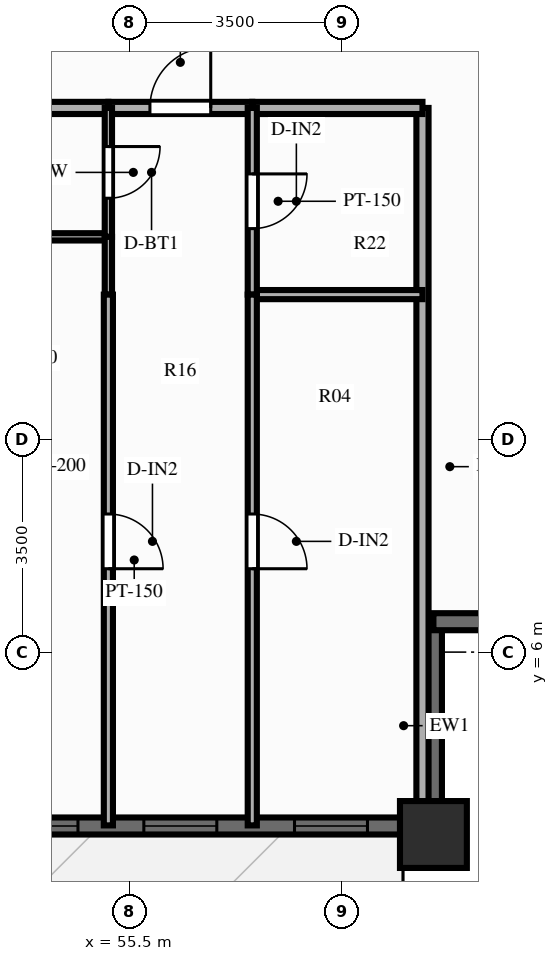
"""IFC4 building model, lengths in metres.
Left out: names, types, materials, properties, quantities, classifications, styles, units other than length and angle.
Written with IfcOpenShell. Run it as: python <this file> out.ifc"""

import sys

from ifc_helpers import new_model, si_unit, direction, frame, frame_2d, origin, origin_2d, place, context, subcontext, project, spatial, rectangle, extrude, source, transform, mapped, element, fill, save


model = new_model("IFC4")
c1 = context("Model", 3, precision=1e-05, world=origin(), true_north=direction((0.0, 1.0)))
c2 = subcontext(c1, "Body", "Model", "MODEL_VIEW")
j1 = project(units=[si_unit("LENGTHUNIT", "METRE"), si_unit("PLANEANGLEUNIT", "RADIAN")], contexts=[c1])
p1 = place(None, origin())
s1 = spatial("IfcSite", under=j1, at=p1, CompositionType="ELEMENT")
p2 = place(p1, origin())
s2 = spatial("IfcBuilding", under=s1, at=p2, CompositionType="ELEMENT")
p3 = place(p2, frame((0.0, 0.0, 22.4)))
s3 = spatial("IfcBuildingStorey", under=s2, at=p3, CompositionType="ELEMENT", Elevation=22.4)
m1 = source(origin(), c2, "Body", "SweptSolid", [
    extrude(rectangle(XDim=1.1, YDim=1.1, at=origin_2d()), origin(), (0.0, 0.0, 1.0), 3.0),
])
p4 = place(p3, frame((60.5, 3.0, 0.0), z_axis=(0.0, 0.0, 1.0), x_axis=(1.0, 0.0, 0.0)))
e1 = element("IfcColumn", 1, at=p4, inside=s3, PredefinedType="COLUMN", context=c2, shape_type="MappedRepresentation", body=[
    mapped(m1, transform((0.0, 0.0, 0.0), scale=1.0)),
])
p5 = place(p3, frame((15.5, 3.14, 0.0), z_axis=(0.0, 0.0, 1.0), x_axis=(1.0, 0.0, 0.0)))
e2 = element("IfcWall", 2, at=p5, inside=s3, PredefinedType="SOLIDWALL", context=c2, shape_type="SweptSolid", body=[
    extrude(rectangle(XDim=45.0, YDim=0.28, at=frame_2d((22.5, 0.0))), origin(), (0.0, 0.0, 1.0), 2.28),
])
p6 = place(p5, frame((0.785, 0.0, 0.25)))
e3 = element("IfcOpeningElement", 3, at=p6, cuts=e2, PredefinedType="OPENING", context=c2, shape_type="SweptSolid", body=[
    extrude(rectangle(XDim=1.2, YDim=1.5, at=frame_2d((0.6, 0.75))), frame((0.0, 0.152, 0.0), z_axis=(0.0, -1.0, 0.0), x_axis=(1.0, 0.0, 0.0)), (0.0, 0.0, 1.0), 0.304),
])
p7 = place(p5, frame((3.033, 0.0, 0.25)))
e4 = element("IfcOpeningElement", 4, at=p7, cuts=e2, PredefinedType="OPENING", context=c2, shape_type="SweptSolid", body=[
    extrude(rectangle(XDim=1.2, YDim=1.5, at=frame_2d((0.6, 0.75))), frame((0.0, 0.152, 0.0), z_axis=(0.0, -1.0, 0.0), x_axis=(1.0, 0.0, 0.0)), (0.0, 0.0, 1.0), 0.304),
])
p8 = place(p5, frame((5.727, 0.0, 0.25)))
e5 = element("IfcOpeningElement", 5, at=p8, cuts=e2, PredefinedType="OPENING", context=c2, shape_type="SweptSolid", body=[
    extrude(rectangle(XDim=1.2, YDim=1.5, at=frame_2d((0.6, 0.75))), frame((0.0, 0.152, 0.0), z_axis=(0.0, -1.0, 0.0), x_axis=(1.0, 0.0, 0.0)), (0.0, 0.0, 1.0), 0.304),
])
p9 = place(p5, frame((8.269, 0.0, 0.25)))
e6 = element("IfcOpeningElement", 6, at=p9, cuts=e2, PredefinedType="OPENING", context=c2, shape_type="SweptSolid", body=[
    extrude(rectangle(XDim=1.2, YDim=1.5, at=frame_2d((0.6, 0.75))), frame((0.0, 0.152, 0.0), z_axis=(0.0, -1.0, 0.0), x_axis=(1.0, 0.0, 0.0)), (0.0, 0.0, 1.0), 0.304),
])
p10 = place(p5, frame((10.621, 0.0, 0.25)))
e7 = element("IfcOpeningElement", 7, at=p10, cuts=e2, PredefinedType="OPENING", context=c2, shape_type="SweptSolid", body=[
    extrude(rectangle(XDim=1.2, YDim=1.5, at=frame_2d((0.6, 0.75))), frame((0.0, 0.152, 0.0), z_axis=(0.0, -1.0, 0.0), x_axis=(1.0, 0.0, 0.0)), (0.0, 0.0, 1.0), 0.304),
])
p11 = place(p5, frame((13.316, 0.0, 0.25)))
e8 = element("IfcOpeningElement", 8, at=p11, cuts=e2, PredefinedType="OPENING", context=c2, shape_type="SweptSolid", body=[
    extrude(rectangle(XDim=1.2, YDim=1.5, at=frame_2d((0.6, 0.75))), frame((0.0, 0.152, 0.0), z_axis=(0.0, -1.0, 0.0), x_axis=(1.0, 0.0, 0.0)), (0.0, 0.0, 1.0), 0.304),
])
p12 = place(p5, frame((16.624, 0.0, 0.25)))
e9 = element("IfcOpeningElement", 9, at=p12, cuts=e2, PredefinedType="OPENING", context=c2, shape_type="SweptSolid", body=[
    extrude(rectangle(XDim=0.7, YDim=1.5, at=frame_2d((0.35, 0.75))), frame((0.0, 0.152, 0.0), z_axis=(0.0, -1.0, 0.0), x_axis=(1.0, 0.0, 0.0)), (0.0, 0.0, 1.0), 0.304),
])
p13 = place(p5, frame((18.141, 0.0, 0.25)))
e10 = element("IfcOpeningElement", 10, at=p13, cuts=e2, PredefinedType="OPENING", context=c2, shape_type="SweptSolid", body=[
    extrude(rectangle(XDim=1.2, YDim=1.5, at=frame_2d((0.6, 0.75))), frame((0.0, 0.152, 0.0), z_axis=(0.0, -1.0, 0.0), x_axis=(1.0, 0.0, 0.0)), (0.0, 0.0, 1.0), 0.304),
])
p14 = place(p5, frame((21.874, 0.0, 0.0), z_axis=(0.0, 0.0, 1.0), x_axis=(-1.0, 0.0, 0.0)))
e11 = element("IfcOpeningElement", 11, at=p14, cuts=e2, PredefinedType="OPENING", context=c2, shape_type="SweptSolid", body=[
    extrude(rectangle(XDim=1.1, YDim=2.15, at=frame_2d((0.55, 1.075))), frame((0.0, 0.152, 0.0), z_axis=(0.0, -1.0, 0.0), x_axis=(1.0, 0.0, 0.0)), (0.0, 0.0, 1.0), 0.304),
])
p15 = place(p5, frame((23.223, 0.0, 0.25)))
e12 = element("IfcOpeningElement", 12, at=p15, cuts=e2, PredefinedType="OPENING", context=c2, shape_type="SweptSolid", body=[
    extrude(rectangle(XDim=1.2, YDim=1.5, at=frame_2d((0.6, 0.75))), frame((0.0, 0.152, 0.0), z_axis=(0.0, -1.0, 0.0), x_axis=(1.0, 0.0, 0.0)), (0.0, 0.0, 1.0), 0.304),
])
p16 = place(p5, frame((25.507, 0.0, 0.25)))
e13 = element("IfcOpeningElement", 13, at=p16, cuts=e2, PredefinedType="OPENING", context=c2, shape_type="SweptSolid", body=[
    extrude(rectangle(XDim=1.2, YDim=1.5, at=frame_2d((0.6, 0.75))), frame((0.0, 0.152, 0.0), z_axis=(0.0, -1.0, 0.0), x_axis=(1.0, 0.0, 0.0)), (0.0, 0.0, 1.0), 0.304),
])
p17 = place(p5, frame((27.6, 0.0, 0.25)))
e14 = element("IfcOpeningElement", 14, at=p17, cuts=e2, PredefinedType="OPENING", context=c2, shape_type="SweptSolid", body=[
    extrude(rectangle(XDim=0.7, YDim=1.5, at=frame_2d((0.35, 0.75))), frame((0.0, 0.152, 0.0), z_axis=(0.0, -1.0, 0.0), x_axis=(1.0, 0.0, 0.0)), (0.0, 0.0, 1.0), 0.304),
])
p18 = place(p5, frame((30.589, 0.0, 0.25)))
e15 = element("IfcOpeningElement", 15, at=p18, cuts=e2, PredefinedType="OPENING", context=c2, shape_type="SweptSolid", body=[
    extrude(rectangle(XDim=1.2, YDim=1.5, at=frame_2d((0.6, 0.75))), frame((0.0, 0.152, 0.0), z_axis=(0.0, -1.0, 0.0), x_axis=(1.0, 0.0, 0.0)), (0.0, 0.0, 1.0), 0.304),
])
p19 = place(p5, frame((32.872, 0.0, 0.25)))
e16 = element("IfcOpeningElement", 16, at=p19, cuts=e2, PredefinedType="OPENING", context=c2, shape_type="SweptSolid", body=[
    extrude(rectangle(XDim=1.2, YDim=1.5, at=frame_2d((0.6, 0.75))), frame((0.0, 0.152, 0.0), z_axis=(0.0, -1.0, 0.0), x_axis=(1.0, 0.0, 0.0)), (0.0, 0.0, 1.0), 0.304),
])
p20 = place(p5, frame((35.455, 0.0, 0.25)))
e17 = element("IfcOpeningElement", 17, at=p20, cuts=e2, PredefinedType="OPENING", context=c2, shape_type="SweptSolid", body=[
    extrude(rectangle(XDim=1.2, YDim=1.5, at=frame_2d((0.6, 0.75))), frame((0.0, 0.152, 0.0), z_axis=(0.0, -1.0, 0.0), x_axis=(1.0, 0.0, 0.0)), (0.0, 0.0, 1.0), 0.304),
])
p21 = place(p5, frame((37.954, 0.0, 0.25)))
e18 = element("IfcOpeningElement", 18, at=p21, cuts=e2, PredefinedType="OPENING", context=c2, shape_type="SweptSolid", body=[
    extrude(rectangle(XDim=1.2, YDim=1.5, at=frame_2d((0.6, 0.75))), frame((0.0, 0.152, 0.0), z_axis=(0.0, -1.0, 0.0), x_axis=(1.0, 0.0, 0.0)), (0.0, 0.0, 1.0), 0.304),
])
p22 = place(p5, frame((40.238, 0.0, 0.25)))
e19 = element("IfcOpeningElement", 19, at=p22, cuts=e2, PredefinedType="OPENING", context=c2, shape_type="SweptSolid", body=[
    extrude(rectangle(XDim=1.2, YDim=1.5, at=frame_2d((0.6, 0.75))), frame((0.0, 0.152, 0.0), z_axis=(0.0, -1.0, 0.0), x_axis=(1.0, 0.0, 0.0)), (0.0, 0.0, 1.0), 0.304),
])
p23 = place(p5, frame((42.716, 0.0, 0.25)))
e20 = element("IfcOpeningElement", 20, at=p23, cuts=e2, PredefinedType="OPENING", context=c2, shape_type="SweptSolid", body=[
    extrude(rectangle(XDim=1.2, YDim=1.5, at=frame_2d((0.6, 0.75))), frame((0.0, 0.152, 0.0), z_axis=(0.0, -1.0, 0.0), x_axis=(1.0, 0.0, 0.0)), (0.0, 0.0, 1.0), 0.304),
])
for number, where, z_axis, x_axis in (
    (21, (60.5, 3.08, 0.0), (0.0, 0.0, 1.0), (0.0, 1.0, 0.0)),
    (22, (60.5, 6.5, 0.0), (0.0, 0.0, 1.0), (1.0, 0.0, 0.0)),
):
    element("IfcWall", number, at=place(p3, frame(where, z_axis=z_axis, x_axis=x_axis)), inside=s3, PredefinedType="SOLIDWALL", context=c2, shape_type="SweptSolid", body=[
        extrude(rectangle(XDim=3.42, YDim=0.28, at=frame_2d((1.71, 0.0))), origin(), (0.0, 0.0, 1.0), 2.28),
    ])
p24 = place(p3, frame((60.32, 14.95, 0.0), z_axis=(0.0, 0.0, 1.0), x_axis=(0.0, -1.0, 0.0)))
e23 = element("IfcWall", 23, at=p24, inside=s3, PredefinedType="PARTITIONING", context=c2, shape_type="SweptSolid", body=[
    extrude(rectangle(XDim=11.8, YDim=0.2, at=frame_2d((5.9, 0.0))), origin(), (0.0, 0.0, 1.0), 2.79),
])
p25 = place(p3, frame((52.954, 14.95, 0.0), z_axis=(0.0, 0.0, 1.0), x_axis=(1.0, 0.0, 0.0)))
e24 = element("IfcWall", 24, at=p25, inside=s3, PredefinedType="PARTITIONING", context=c2, shape_type="SweptSolid", body=[
    extrude(rectangle(XDim=2.2, YDim=0.2, at=frame_2d((1.1, 0.0))), origin(), (0.0, 0.0, 1.0), 2.79),
])
p26 = place(p3, frame((55.154, 14.95, 0.0), z_axis=(0.0, 0.0, 1.0), x_axis=(1.0, 0.0, 0.0)))
e25 = element("IfcWall", 25, at=p26, inside=s3, PredefinedType="PARTITIONING", context=c2, shape_type="SweptSolid", body=[
    extrude(rectangle(XDim=2.367, YDim=0.2, at=frame_2d((1.183, 0.0))), origin(), (0.0, 0.0, 1.0), 2.79),
])
p27 = place(p26, frame((0.683, 0.0, 0.0)))
e26 = element("IfcOpeningElement", 26, at=p27, cuts=e25, PredefinedType="OPENING", context=c2, shape_type="SweptSolid", body=[
    extrude(rectangle(XDim=1.0, YDim=2.15, at=frame_2d((0.5, 1.075))), frame((0.0, 0.112, 0.0), z_axis=(0.0, -1.0, 0.0), x_axis=(1.0, 0.0, 0.0)), (0.0, 0.0, 1.0), 0.224),
])
p28 = place(p3, frame((57.521, 14.95, 0.0), z_axis=(0.0, 0.0, 1.0), x_axis=(1.0, 0.0, 0.0)))
e27 = element("IfcWall", 27, at=p28, inside=s3, PredefinedType="PARTITIONING", context=c2, shape_type="SweptSolid", body=[
    extrude(rectangle(XDim=2.799, YDim=0.2, at=frame_2d((1.399, 0.0))), origin(), (0.0, 0.0, 1.0), 2.79),
])
p29 = place(p3, frame((52.954, 12.83, 0.0), z_axis=(0.0, 0.0, 1.0), x_axis=(1.0, 0.0, 0.0)))
e28 = element("IfcWall", 28, at=p29, inside=s3, PredefinedType="PARTITIONING", context=c2, shape_type="SweptSolid", body=[
    extrude(rectangle(XDim=2.2, YDim=0.12, at=frame_2d((1.1, 0.0))), origin(), (0.0, 0.0, 1.0), 2.79),
])
p30 = place(p3, frame((57.521, 11.88, 0.0), z_axis=(0.0, 0.0, 1.0), x_axis=(1.0, 0.0, 0.0)))
e29 = element("IfcWall", 29, at=p30, inside=s3, PredefinedType="PARTITIONING", context=c2, shape_type="SweptSolid", body=[
    extrude(rectangle(XDim=2.799, YDim=0.15, at=frame_2d((1.399, 0.0))), origin(), (0.0, 0.0, 1.0), 2.79),
])
p31 = place(p3, frame((55.154, 14.95, 0.0), z_axis=(0.0, 0.0, 1.0), x_axis=(0.0, -1.0, 0.0)))
e30 = element("IfcWall", 30, at=p31, inside=s3, PredefinedType="PARTITIONING", context=c2, shape_type="SweptSolid", body=[
    extrude(rectangle(XDim=2.12, YDim=0.12, at=frame_2d((1.06, 0.0))), origin(), (0.0, 0.0, 1.0), 2.79),
])
p32 = place(p31, frame((0.635, 0.0, 0.0)))
e31 = element("IfcOpeningElement", 31, at=p32, cuts=e30, PredefinedType="OPENING", context=c2, shape_type="SweptSolid", body=[
    extrude(rectangle(XDim=0.85, YDim=2.05, at=frame_2d((0.425, 1.025))), frame((0.0, 0.072, 0.0), z_axis=(0.0, -1.0, 0.0), x_axis=(1.0, 0.0, 0.0)), (0.0, 0.0, 1.0), 0.144),
])
p33 = place(p3, frame((55.154, 12.83, 0.0), z_axis=(0.0, 0.0, 1.0), x_axis=(0.0, -1.0, 0.0)))
e32 = element("IfcWall", 32, at=p33, inside=s3, PredefinedType="PARTITIONING", context=c2, shape_type="SweptSolid", body=[
    extrude(rectangle(XDim=0.95, YDim=0.12, at=frame_2d((0.475, 0.0))), origin(), (0.0, 0.0, 1.0), 2.79),
])
p34 = place(p3, frame((55.154, 11.88, 0.0), z_axis=(0.0, 0.0, 1.0), x_axis=(0.0, -1.0, 0.0)))
e33 = element("IfcWall", 33, at=p34, inside=s3, PredefinedType="PARTITIONING", context=c2, shape_type="SweptSolid", body=[
    extrude(rectangle(XDim=8.73, YDim=0.15, at=frame_2d((4.365, 0.0))), origin(), (0.0, 0.0, 1.0), 2.79),
])
p35 = place(p34, frame((3.609, 0.0, 0.0)))
e34 = element("IfcOpeningElement", 34, at=p35, cuts=e33, PredefinedType="OPENING", context=c2, shape_type="SweptSolid", body=[
    extrude(rectangle(XDim=0.9, YDim=2.1, at=frame_2d((0.45, 1.05))), frame((0.0, 0.087, 0.0), z_axis=(0.0, -1.0, 0.0), x_axis=(1.0, 0.0, 0.0)), (0.0, 0.0, 1.0), 0.174),
])
p36 = place(p3, frame((57.521, 14.95, 0.0), z_axis=(0.0, 0.0, 1.0), x_axis=(0.0, -1.0, 0.0)))
e35 = element("IfcWall", 35, at=p36, inside=s3, PredefinedType="PARTITIONING", context=c2, shape_type="SweptSolid", body=[
    extrude(rectangle(XDim=3.07, YDim=0.15, at=frame_2d((1.535, 0.0))), origin(), (0.0, 0.0, 1.0), 2.79),
])
p37 = place(p36, frame((1.085, 0.0, 0.0)))
e36 = element("IfcOpeningElement", 36, at=p37, cuts=e35, PredefinedType="OPENING", context=c2, shape_type="SweptSolid", body=[
    extrude(rectangle(XDim=0.9, YDim=2.1, at=frame_2d((0.45, 1.05))), frame((0.0, 0.087, 0.0), z_axis=(0.0, -1.0, 0.0), x_axis=(1.0, 0.0, 0.0)), (0.0, 0.0, 1.0), 0.174),
])
p38 = place(p3, frame((57.521, 11.88, 0.0), z_axis=(0.0, 0.0, 1.0), x_axis=(0.0, -1.0, 0.0)))
e37 = element("IfcWall", 37, at=p38, inside=s3, PredefinedType="PARTITIONING", context=c2, shape_type="SweptSolid", body=[
    extrude(rectangle(XDim=8.73, YDim=0.15, at=frame_2d((4.365, 0.0))), origin(), (0.0, 0.0, 1.0), 2.79),
])
p39 = place(p38, frame((3.609, 0.0, 0.0)))
e38 = element("IfcOpeningElement", 38, at=p39, cuts=e37, PredefinedType="OPENING", context=c2, shape_type="SweptSolid", body=[
    extrude(rectangle(XDim=0.9, YDim=2.1, at=frame_2d((0.45, 1.05))), frame((0.0, 0.087, 0.0), z_axis=(0.0, -1.0, 0.0), x_axis=(1.0, 0.0, 0.0)), (0.0, 0.0, 1.0), 0.174),
])
m2 = source(origin(), c2, "Body", "SweptSolid", [
    extrude(rectangle(XDim=1.2, YDim=1.5, at=frame_2d((0.6, 0.75))), frame((0.0, 0.03, 0.0), z_axis=(0.0, -1.0, 0.0), x_axis=(1.0, 0.0, 0.0)), (0.0, 0.0, 1.0), 0.06),
])
p40 = place(p21, origin())
e39 = element("IfcWindow", 39, at=p40, inside=s3, PartitioningType="SINGLE_PANEL", PredefinedType="WINDOW", context=c2, shape_type="MappedRepresentation", body=[
    mapped(m2, transform((0.0, 0.0, 0.0), scale=1.0)),
])
fill(e18, e39)
p41 = place(p22, origin())
e40 = element("IfcWindow", 40, at=p41, inside=s3, PartitioningType="SINGLE_PANEL", PredefinedType="WINDOW", context=c2, shape_type="MappedRepresentation", body=[
    mapped(m2, transform((0.0, 0.0, 0.0), scale=1.0)),
])
fill(e19, e40)
p42 = place(p23, origin())
e41 = element("IfcWindow", 41, at=p42, inside=s3, PartitioningType="SINGLE_PANEL", PredefinedType="WINDOW", context=c2, shape_type="MappedRepresentation", body=[
    mapped(m2, transform((0.0, 0.0, 0.0), scale=1.0)),
])
fill(e20, e41)
m3 = source(origin(), c2, "Body", "SweptSolid", [
    extrude(rectangle(XDim=1.0, YDim=2.15, at=frame_2d((0.5, 1.075))), frame((0.0, 0.025, 0.0), z_axis=(0.0, -1.0, 0.0), x_axis=(1.0, 0.0, 0.0)), (0.0, 0.0, 1.0), 0.05),
])
p43 = place(p27, origin())
e42 = element("IfcDoor", 42, at=p43, inside=s3, OperationType="SINGLE_SWING_RIGHT", PredefinedType="DOOR", context=c2, shape_type="MappedRepresentation", body=[
    mapped(m3, transform((0.0, 0.0, 0.0), scale=1.0)),
])
fill(e26, e42)
m4 = source(origin(), c2, "Body", "SweptSolid", [
    extrude(rectangle(XDim=0.85, YDim=2.05, at=frame_2d((0.425, 1.025))), frame((0.0, 0.025, 0.0), z_axis=(0.0, -1.0, 0.0), x_axis=(1.0, 0.0, 0.0)), (0.0, 0.0, 1.0), 0.05),
])
p44 = place(p32, origin())
e43 = element("IfcDoor", 43, at=p44, inside=s3, OperationType="SINGLE_SWING_LEFT", PredefinedType="DOOR", context=c2, shape_type="MappedRepresentation", body=[
    mapped(m4, transform((0.0, 0.0, 0.0), scale=1.0)),
])
fill(e31, e43)
m5 = source(origin(), c2, "Body", "SweptSolid", [
    extrude(rectangle(XDim=0.9, YDim=2.1, at=frame_2d((0.45, 1.05))), frame((0.0, 0.025, 0.0), z_axis=(0.0, -1.0, 0.0), x_axis=(1.0, 0.0, 0.0)), (0.0, 0.0, 1.0), 0.05),
])
p45 = place(p35, origin())
e44 = element("IfcDoor", 44, at=p45, inside=s3, OperationType="SINGLE_SWING_RIGHT", PredefinedType="DOOR", context=c2, shape_type="MappedRepresentation", body=[
    mapped(m5, transform((0.0, 0.0, 0.0), scale=1.0)),
])
fill(e34, e44)
p46 = place(p37, origin())
e45 = element("IfcDoor", 45, at=p46, inside=s3, OperationType="SINGLE_SWING_LEFT", PredefinedType="DOOR", context=c2, shape_type="MappedRepresentation", body=[
    mapped(m5, transform((0.0, 0.0, 0.0), scale=1.0)),
])
fill(e36, e45)
p47 = place(p39, origin())
e46 = element("IfcDoor", 46, at=p47, inside=s3, OperationType="SINGLE_SWING_RIGHT", PredefinedType="DOOR", context=c2, shape_type="MappedRepresentation", body=[
    mapped(m5, transform((0.0, 0.0, 0.0), scale=1.0)),
])
fill(e38, e46)
save(model, sys.argv[1])
